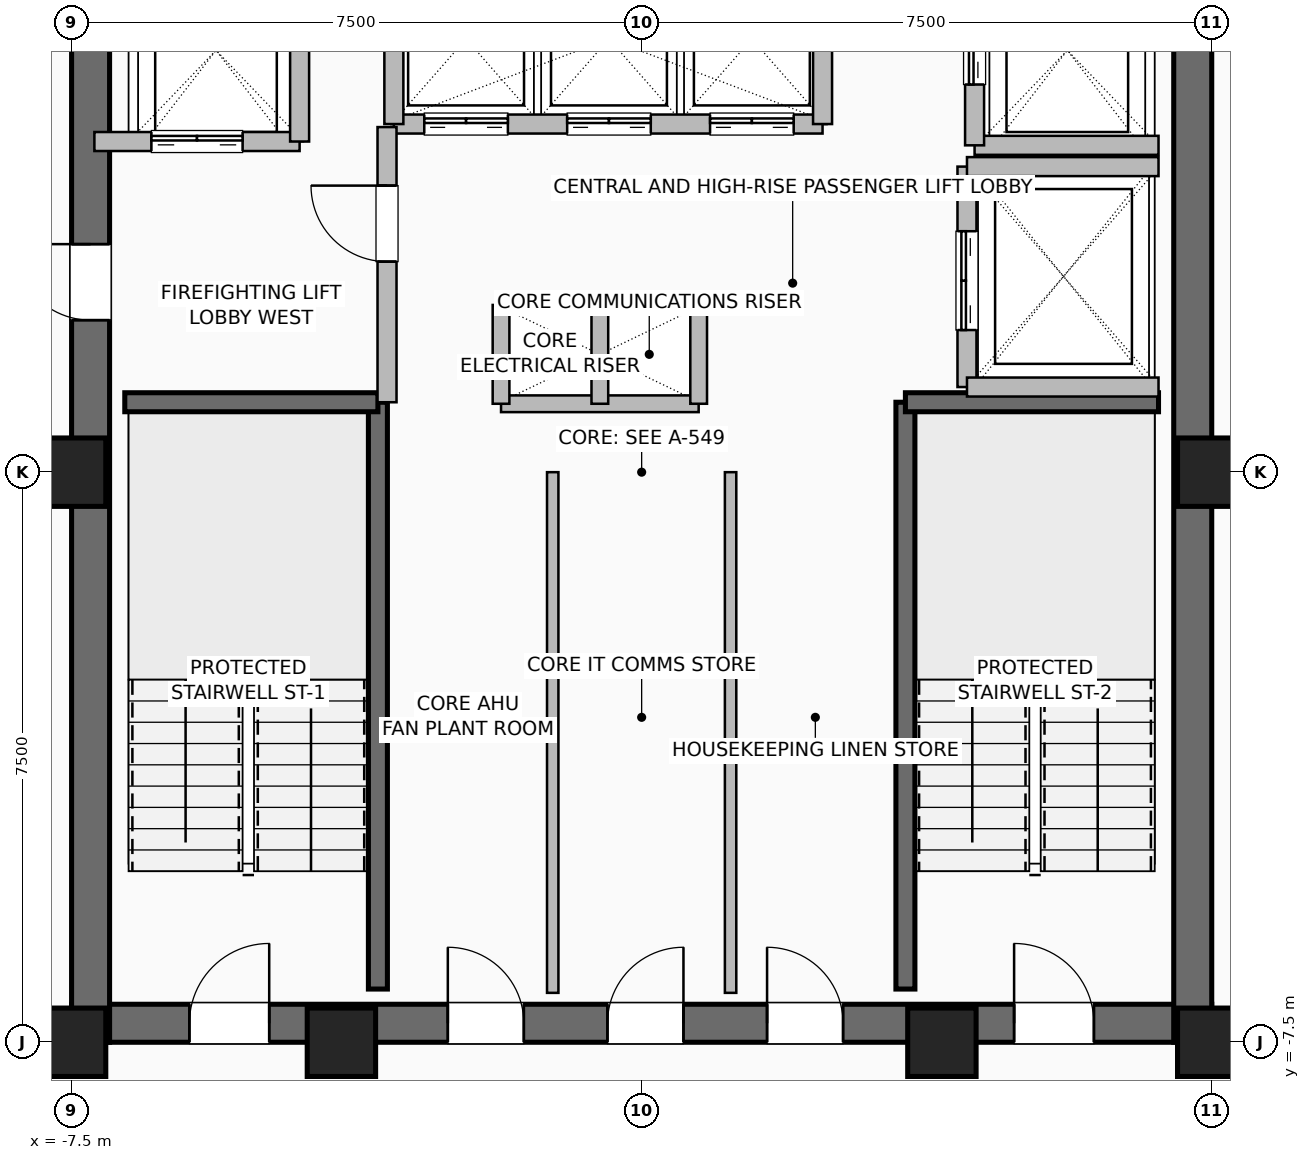
"""IFC4 building model, lengths in metres.
Left out: names, types, materials, properties, quantities, classifications, styles, units other than length and angle.
Written with IfcOpenShell. Run it as: python <this file> out.ifc"""

import sys

from ifc_helpers import new_model, si_unit, direction, frame, frame_2d, origin, origin_2d, place, context, subcontext, project, spatial, rectangle, hollow_rectangle, extrude, element, fill, save


model = new_model("IFC4")
c1 = context("Model", 3, precision=1e-05, world=origin(), true_north=direction((0.0, 1.0)))
c2 = subcontext(c1, "Body", "Model", "MODEL_VIEW")
j1 = project(units=[si_unit("LENGTHUNIT", "METRE"), si_unit("PLANEANGLEUNIT", "RADIAN")], contexts=[c1])
p1 = place(None, origin())
s1 = spatial("IfcSite", under=j1, at=p1, CompositionType="ELEMENT")
p2 = place(p1, origin())
s2 = spatial("IfcBuilding", under=s1, at=p2, CompositionType="ELEMENT")
p3 = place(p2, frame((0.0, 0.0, 191.4)))
s3 = spatial("IfcBuildingStorey", under=s2, at=p3, CompositionType="ELEMENT", Elevation=191.4)
for number, where, z_axis, x_axis in (
    (1, (-7.5, -7.5, 0.0), (0.0, 0.0, 1.0), (1.0, 0.0, 0.0)),
    (2, (-3.95, -7.5, 0.0), (0.0, 0.0, 1.0), (1.0, 0.0, 0.0)),
    (3, (3.95, -7.5, 0.0), (0.0, 0.0, 1.0), (1.0, 0.0, 0.0)),
    (4, (7.5, -7.5, 0.0), (0.0, 0.0, 1.0), (1.0, 0.0, 0.0)),
    (5, (7.5, 0.0, 0.0), (0.0, 0.0, 1.0), (1.0, 0.0, 0.0)),
    (6, (-7.5, 0.0, 0.0), (0.0, 0.0, 1.0), (1.0, 0.0, 0.0)),
):
    element("IfcColumn", number, at=place(p3, frame(where, z_axis=z_axis, x_axis=x_axis)), inside=s3, PredefinedType="COLUMN", context=c2, shape_type="SweptSolid", body=[
        extrude(hollow_rectangle(XDim=0.9, YDim=0.9, WallThickness=0.045, at=origin_2d()), origin(), (0.0, 0.0, 1.0), 3.6),
    ])
p4 = place(p3, frame((-7.5, -7.25, 0.0), z_axis=(0.0, 0.0, 1.0), x_axis=(1.0, 0.0, 0.0)))
e7 = element("IfcWall", 7, at=p4, inside=s3, PredefinedType="SHEAR", context=c2, shape_type="SweptSolid", body=[
    extrude(rectangle(XDim=15.0, YDim=0.5, at=frame_2d((7.5, 0.0))), origin(), (0.0, 0.0, 1.0), 3.36),
])
p5 = place(p4, frame((1.55, 0.0, 0.0)))
e8 = element("IfcOpeningElement", 8, at=p5, cuts=e7, PredefinedType="OPENING", context=c2, shape_type="SweptSolid", body=[
    extrude(rectangle(XDim=1.05, YDim=2.08, at=frame_2d((0.525, 1.04))), frame((0.0, 0.26, 0.0), z_axis=(0.0, -1.0, 0.0), x_axis=(1.0, 0.0, 0.0)), (0.0, 0.0, 1.0), 0.52),
])
p6 = place(p4, frame((12.4, 0.0, 0.0)))
e9 = element("IfcOpeningElement", 9, at=p6, cuts=e7, PredefinedType="OPENING", context=c2, shape_type="SweptSolid", body=[
    extrude(rectangle(XDim=1.05, YDim=2.08, at=frame_2d((0.525, 1.04))), frame((0.0, 0.26, 0.0), z_axis=(0.0, -1.0, 0.0), x_axis=(1.0, 0.0, 0.0)), (0.0, 0.0, 1.0), 0.52),
])
p7 = place(p4, frame((4.95, 0.0, 0.0)))
e10 = element("IfcOpeningElement", 10, at=p7, cuts=e7, PredefinedType="OPENING", context=c2, shape_type="SweptSolid", body=[
    extrude(rectangle(XDim=1.0, YDim=2.08, at=frame_2d((0.5, 1.04))), frame((0.0, 0.26, 0.0), z_axis=(0.0, -1.0, 0.0), x_axis=(1.0, 0.0, 0.0)), (0.0, 0.0, 1.0), 0.52),
])
p8 = place(p4, frame((7.05, 0.0, 0.0)))
e11 = element("IfcOpeningElement", 11, at=p8, cuts=e7, PredefinedType="OPENING", context=c2, shape_type="SweptSolid", body=[
    extrude(rectangle(XDim=1.0, YDim=2.08, at=frame_2d((0.5, 1.04))), frame((0.0, 0.26, 0.0), z_axis=(0.0, -1.0, 0.0), x_axis=(1.0, 0.0, 0.0)), (0.0, 0.0, 1.0), 0.52),
])
p9 = place(p4, frame((9.15, 0.0, 0.0)))
e12 = element("IfcOpeningElement", 12, at=p9, cuts=e7, PredefinedType="OPENING", context=c2, shape_type="SweptSolid", body=[
    extrude(rectangle(XDim=1.0, YDim=2.08, at=frame_2d((0.5, 1.04))), frame((0.0, 0.26, 0.0), z_axis=(0.0, -1.0, 0.0), x_axis=(1.0, 0.0, 0.0)), (0.0, 0.0, 1.0), 0.52),
])
p10 = place(p3, frame((-7.25, -7.5, 0.0), z_axis=(0.0, 0.0, 1.0), x_axis=(0.0, 1.0, 0.0)))
e13 = element("IfcWall", 13, at=p10, inside=s3, PredefinedType="SHEAR", context=c2, shape_type="SweptSolid", body=[
    extrude(rectangle(XDim=15.0, YDim=0.5, at=frame_2d((7.5, 0.0))), origin(), (0.0, 0.0, 1.0), 3.36),
])
p11 = place(p10, frame((9.5, 0.0, 0.0)))
e14 = element("IfcOpeningElement", 14, at=p11, cuts=e13, PredefinedType="OPENING", context=c2, shape_type="SweptSolid", body=[
    extrude(rectangle(XDim=1.0, YDim=2.08, at=frame_2d((0.5, 1.04))), frame((0.0, 0.26, 0.0), z_axis=(0.0, -1.0, 0.0), x_axis=(1.0, 0.0, 0.0)), (0.0, 0.0, 1.0), 0.52),
])
p12 = place(p3, frame((7.25, -7.5, 0.0), z_axis=(0.0, 0.0, 1.0), x_axis=(0.0, 1.0, 0.0)))
e15 = element("IfcWall", 15, at=p12, inside=s3, PredefinedType="SHEAR", context=c2, shape_type="SweptSolid", body=[
    extrude(rectangle(XDim=15.0, YDim=0.5, at=frame_2d((7.5, 0.0))), origin(), (0.0, 0.0, 1.0), 3.36),
])
p13 = place(p3, frame((-3.47, -6.8, 0.0), z_axis=(0.0, 0.0, 1.0), x_axis=(0.0, 1.0, 0.0)))
e16 = element("IfcWall", 16, at=p13, inside=s3, PredefinedType="SHEAR", context=c2, shape_type="SweptSolid", body=[
    extrude(rectangle(XDim=7.72, YDim=0.25, at=frame_2d((3.86, 0.0))), origin(), (0.0, 0.0, 1.0), 3.36),
])
p14 = place(p3, frame((-6.8, 0.92, 0.0), z_axis=(0.0, 0.0, 1.0), x_axis=(1.0, 0.0, 0.0)))
e17 = element("IfcWall", 17, at=p14, inside=s3, PredefinedType="SHEAR", context=c2, shape_type="SweptSolid", body=[
    extrude(rectangle(XDim=3.33, YDim=0.25, at=frame_2d((1.665, 0.0))), origin(), (0.0, 0.0, 1.0), 3.36),
])
p15 = place(p3, frame((3.47, -6.8, 0.0), z_axis=(0.0, 0.0, 1.0), x_axis=(0.0, 1.0, 0.0)))
e18 = element("IfcWall", 18, at=p15, inside=s3, PredefinedType="SHEAR", context=c2, shape_type="SweptSolid", body=[
    extrude(rectangle(XDim=7.72, YDim=0.25, at=frame_2d((3.86, 0.0))), origin(), (0.0, 0.0, 1.0), 3.36),
])
p16 = place(p3, frame((3.47, 0.92, 0.0), z_axis=(0.0, 0.0, 1.0), x_axis=(1.0, 0.0, 0.0)))
e19 = element("IfcWall", 19, at=p16, inside=s3, PredefinedType="SHEAR", context=c2, shape_type="SweptSolid", body=[
    extrude(rectangle(XDim=3.33, YDim=0.25, at=frame_2d((1.665, 0.0))), origin(), (0.0, 0.0, 1.0), 3.36),
])
for number, where, z_axis, x_axis in (
    (20, (-1.85, 2.2, 0.0), (0.0, 0.0, 1.0), (1.0, 0.0, 0.0)),
    (21, (-1.85, 0.9, 0.0), (0.0, 0.0, 1.0), (1.0, 0.0, 0.0)),
):
    element("IfcWall", number, at=place(p3, frame(where, z_axis=z_axis, x_axis=x_axis)), inside=s3, PredefinedType="PARTITIONING", context=c2, shape_type="SweptSolid", body=[
        extrude(rectangle(XDim=2.6, YDim=0.22, at=frame_2d((1.3, 0.0))), origin(), (0.0, 0.0, 1.0), 3.36),
    ])
for number, where, z_axis, x_axis in (
    (22, (-0.55, 0.9, 0.0), (0.0, 0.0, 1.0), (0.0, 1.0, 0.0)),
    (23, (0.75, 0.9, 0.0), (0.0, 0.0, 1.0), (0.0, 1.0, 0.0)),
    (24, (-1.85, 0.9, 0.0), (0.0, 0.0, 1.0), (0.0, 1.0, 0.0)),
):
    element("IfcWall", number, at=place(p3, frame(where, z_axis=z_axis, x_axis=x_axis)), inside=s3, PredefinedType="PARTITIONING", context=c2, shape_type="SweptSolid", body=[
        extrude(rectangle(XDim=1.3, YDim=0.22, at=frame_2d((0.65, 0.0))), origin(), (0.0, 0.0, 1.0), 3.36),
    ])
p17 = place(p3, frame((-3.26, 4.58, 0.0), z_axis=(0.0, 0.0, 1.0), x_axis=(1.0, 0.0, 0.0)))
e25 = element("IfcWall", 25, at=p17, inside=s3, PredefinedType="SHEAR", context=c2, shape_type="SweptSolid", body=[
    extrude(rectangle(XDim=5.64, YDim=0.25, at=frame_2d((2.82, 0.0))), origin(), (0.0, 0.0, 1.0), 3.36),
])
p18 = place(p17, frame((0.4, 0.0, 0.0)))
e26 = element("IfcOpeningElement", 26, at=p18, cuts=e25, PredefinedType="OPENING", context=c2, shape_type="SweptSolid", body=[
    extrude(rectangle(XDim=1.1, YDim=2.2, at=frame_2d((0.55, 1.1))), frame((0.0, 0.135, 0.0), z_axis=(0.0, -1.0, 0.0), x_axis=(1.0, 0.0, 0.0)), (0.0, 0.0, 1.0), 0.27),
])
p19 = place(p17, frame((2.28, 0.0, 0.0)))
e27 = element("IfcOpeningElement", 27, at=p19, cuts=e25, PredefinedType="OPENING", context=c2, shape_type="SweptSolid", body=[
    extrude(rectangle(XDim=1.1, YDim=2.2, at=frame_2d((0.55, 1.1))), frame((0.0, 0.135, 0.0), z_axis=(0.0, -1.0, 0.0), x_axis=(1.0, 0.0, 0.0)), (0.0, 0.0, 1.0), 0.27),
])
p20 = place(p17, frame((4.16, 0.0, 0.0)))
e28 = element("IfcOpeningElement", 28, at=p20, cuts=e25, PredefinedType="OPENING", context=c2, shape_type="SweptSolid", body=[
    extrude(rectangle(XDim=1.1, YDim=2.2, at=frame_2d((0.55, 1.1))), frame((0.0, 0.135, 0.0), z_axis=(0.0, -1.0, 0.0), x_axis=(1.0, 0.0, 0.0)), (0.0, 0.0, 1.0), 0.27),
])
for number, where, z_axis, x_axis in (
    (29, (-3.26, 4.58, 0.0), (0.0, 0.0, 1.0), (0.0, 1.0, 0.0)),
    (30, (2.38, 4.58, 0.0), (0.0, 0.0, 1.0), (0.0, 1.0, 0.0)),
):
    element("IfcWall", number, at=place(p3, frame(where, z_axis=z_axis, x_axis=x_axis)), inside=s3, PredefinedType="SHEAR", context=c2, shape_type="SweptSolid", body=[
        extrude(rectangle(XDim=2.22, YDim=0.25, at=frame_2d((1.11, 0.0))), origin(), (0.0, 0.0, 1.0), 3.36),
    ])
p21 = place(p3, frame((-7.2, 4.35, 0.0), z_axis=(0.0, 0.0, 1.0), x_axis=(1.0, 0.0, 0.0)))
e31 = element("IfcWall", 31, at=p21, inside=s3, PredefinedType="SHEAR", context=c2, shape_type="SweptSolid", body=[
    extrude(rectangle(XDim=2.7, YDim=0.25, at=frame_2d((1.35, 0.0))), origin(), (0.0, 0.0, 1.0), 3.36),
])
p22 = place(p21, frame((0.75, 0.0, 0.0)))
e32 = element("IfcOpeningElement", 32, at=p22, cuts=e31, PredefinedType="OPENING", context=c2, shape_type="SweptSolid", body=[
    extrude(rectangle(XDim=1.2, YDim=2.2, at=frame_2d((0.6, 1.1))), frame((0.0, 0.135, 0.0), z_axis=(0.0, -1.0, 0.0), x_axis=(1.0, 0.0, 0.0)), (0.0, 0.0, 1.0), 0.27),
])
p23 = place(p3, frame((-4.5, 4.35, 0.0), z_axis=(0.0, 0.0, 1.0), x_axis=(0.0, 1.0, 0.0)))
e33 = element("IfcWall", 33, at=p23, inside=s3, PredefinedType="SHEAR", context=c2, shape_type="SweptSolid", body=[
    extrude(rectangle(XDim=2.85, YDim=0.25, at=frame_2d((1.425, 0.0))), origin(), (0.0, 0.0, 1.0), 3.36),
])
p24 = place(p3, frame((4.38, 4.3, 0.0), z_axis=(0.0, 0.0, 1.0), x_axis=(1.0, 0.0, 0.0)))
e34 = element("IfcWall", 34, at=p24, inside=s3, PredefinedType="SHEAR", context=c2, shape_type="SweptSolid", body=[
    extrude(rectangle(XDim=2.42, YDim=0.25, at=frame_2d((1.21, 0.0))), origin(), (0.0, 0.0, 1.0), 3.36),
])
p25 = place(p3, frame((4.38, 4.3, 0.0), z_axis=(0.0, 0.0, 1.0), x_axis=(0.0, 1.0, 0.0)))
e35 = element("IfcWall", 35, at=p25, inside=s3, PredefinedType="SHEAR", context=c2, shape_type="SweptSolid", body=[
    extrude(rectangle(XDim=2.5, YDim=0.25, at=frame_2d((1.25, 0.0))), origin(), (0.0, 0.0, 1.0), 3.36),
])
p26 = place(p25, frame((0.8, 0.0, 0.0)))
e36 = element("IfcOpeningElement", 36, at=p26, cuts=e35, PredefinedType="OPENING", context=c2, shape_type="SweptSolid", body=[
    extrude(rectangle(XDim=1.2, YDim=2.2, at=frame_2d((0.6, 1.1))), frame((0.0, 0.135, 0.0), z_axis=(0.0, -1.0, 0.0), x_axis=(1.0, 0.0, 0.0)), (0.0, 0.0, 1.0), 0.27),
])
p27 = place(p3, frame((4.28, 1.12, 0.0), z_axis=(0.0, 0.0, 1.0), x_axis=(0.0, 1.0, 0.0)))
e37 = element("IfcWall", 37, at=p27, inside=s3, PredefinedType="SHEAR", context=c2, shape_type="SweptSolid", body=[
    extrude(rectangle(XDim=2.9, YDim=0.25, at=frame_2d((1.45, 0.0))), origin(), (0.0, 0.0, 1.0), 3.36),
])
p28 = place(p27, frame((0.75, 0.0, 0.0)))
e38 = element("IfcOpeningElement", 38, at=p28, cuts=e37, PredefinedType="OPENING", context=c2, shape_type="SweptSolid", body=[
    extrude(rectangle(XDim=1.3, YDim=2.3, at=frame_2d((0.65, 1.15))), frame((0.0, 0.135, 0.0), z_axis=(0.0, -1.0, 0.0), x_axis=(1.0, 0.0, 0.0)), (0.0, 0.0, 1.0), 0.27),
])
for number, where, z_axis, x_axis in (
    (39, (4.28, 1.12, 0.0), (0.0, 0.0, 1.0), (1.0, 0.0, 0.0)),
    (40, (4.28, 4.02, 0.0), (0.0, 0.0, 1.0), (1.0, 0.0, 0.0)),
):
    element("IfcWall", number, at=place(p3, frame(where, z_axis=z_axis, x_axis=x_axis)), inside=s3, PredefinedType="SHEAR", context=c2, shape_type="SweptSolid", body=[
        extrude(rectangle(XDim=2.52, YDim=0.25, at=frame_2d((1.26, 0.0))), origin(), (0.0, 0.0, 1.0), 3.36),
    ])
p29 = place(p3, frame((-3.35, 0.92, 0.0), z_axis=(0.0, 0.0, 1.0), x_axis=(0.0, 1.0, 0.0)))
e41 = element("IfcWall", 41, at=p29, inside=s3, PredefinedType="SHEAR", context=c2, shape_type="SweptSolid", body=[
    extrude(rectangle(XDim=3.62, YDim=0.25, at=frame_2d((1.81, 0.0))), origin(), (0.0, 0.0, 1.0), 3.36),
])
p30 = place(p29, frame((1.85, 0.0, 0.0)))
e42 = element("IfcOpeningElement", 42, at=p30, cuts=e41, PredefinedType="OPENING", context=c2, shape_type="SweptSolid", body=[
    extrude(rectangle(XDim=1.0, YDim=2.08, at=frame_2d((0.5, 1.04))), frame((0.0, 0.135, 0.0), z_axis=(0.0, -1.0, 0.0), x_axis=(1.0, 0.0, 0.0)), (0.0, 0.0, 1.0), 0.27),
])
for number, where, z_axis, x_axis in (
    (43, (-1.17, -6.85, 0.0), (0.0, 0.0, 1.0), (0.0, 1.0, 0.0)),
    (44, (1.17, -6.85, 0.0), (0.0, 0.0, 1.0), (0.0, 1.0, 0.0)),
):
    element("IfcWall", number, at=place(p3, frame(where, z_axis=z_axis, x_axis=x_axis)), inside=s3, PredefinedType="PARTITIONING", context=c2, shape_type="SweptSolid", body=[
        extrude(rectangle(XDim=6.85, YDim=0.15, at=frame_2d((3.425, 0.0))), origin(), (0.0, 0.0, 1.0), 3.36),
    ])
p31 = place(p3, frame((7.45, -7.48, 0.0), z_axis=(0.0, 0.0, 1.0), x_axis=(1.0, 0.0, 0.0)))
e45 = element("IfcWall", 45, at=p31, inside=s3, PredefinedType="PARTITIONING", context=c2, shape_type="SweptSolid", body=[
    extrude(rectangle(XDim=0.95, YDim=0.15, at=frame_2d((0.475, 0.0))), origin(), (0.0, 0.0, 1.0), 3.36),
])
p32 = place(p5, origin())
e46 = element("IfcDoor", 46, at=p32, inside=s3, OperationType="SINGLE_SWING_RIGHT", PredefinedType="DOOR", context=c2, shape_type="SweptSolid", body=[
    extrude(rectangle(XDim=1.05, YDim=2.08, at=frame_2d((0.525, 1.04))), frame((0.0, 0.025, 0.0), z_axis=(0.0, -1.0, 0.0), x_axis=(1.0, 0.0, 0.0)), (0.0, 0.0, 1.0), 0.05),
])
fill(e8, e46)
p33 = place(p6, origin())
e47 = element("IfcDoor", 47, at=p33, inside=s3, OperationType="SINGLE_SWING_LEFT", PredefinedType="DOOR", context=c2, shape_type="SweptSolid", body=[
    extrude(rectangle(XDim=1.05, YDim=2.08, at=frame_2d((0.525, 1.04))), frame((0.0, 0.025, 0.0), z_axis=(0.0, -1.0, 0.0), x_axis=(1.0, 0.0, 0.0)), (0.0, 0.0, 1.0), 0.05),
])
fill(e9, e47)
p34 = place(p11, origin())
e48 = element("IfcDoor", 48, at=p34, inside=s3, OperationType="SINGLE_SWING_RIGHT", PredefinedType="DOOR", context=c2, shape_type="SweptSolid", body=[
    extrude(rectangle(XDim=1.0, YDim=2.08, at=frame_2d((0.5, 1.04))), frame((0.0, 0.025, 0.0), z_axis=(0.0, -1.0, 0.0), x_axis=(1.0, 0.0, 0.0)), (0.0, 0.0, 1.0), 0.05),
])
fill(e14, e48)
p35 = place(p7, origin())
e49 = element("IfcDoor", 49, at=p35, inside=s3, OperationType="SINGLE_SWING_LEFT", PredefinedType="DOOR", context=c2, shape_type="SweptSolid", body=[
    extrude(rectangle(XDim=1.0, YDim=2.08, at=frame_2d((0.5, 1.04))), frame((0.0, 0.025, 0.0), z_axis=(0.0, -1.0, 0.0), x_axis=(1.0, 0.0, 0.0)), (0.0, 0.0, 1.0), 0.05),
])
fill(e10, e49)
p36 = place(p8, origin())
e50 = element("IfcDoor", 50, at=p36, inside=s3, OperationType="SINGLE_SWING_RIGHT", PredefinedType="DOOR", context=c2, shape_type="SweptSolid", body=[
    extrude(rectangle(XDim=1.0, YDim=2.08, at=frame_2d((0.5, 1.04))), frame((0.0, 0.025, 0.0), z_axis=(0.0, -1.0, 0.0), x_axis=(1.0, 0.0, 0.0)), (0.0, 0.0, 1.0), 0.05),
])
fill(e11, e50)
p37 = place(p9, origin())
e51 = element("IfcDoor", 51, at=p37, inside=s3, OperationType="SINGLE_SWING_LEFT", PredefinedType="DOOR", context=c2, shape_type="SweptSolid", body=[
    extrude(rectangle(XDim=1.0, YDim=2.08, at=frame_2d((0.5, 1.04))), frame((0.0, 0.025, 0.0), z_axis=(0.0, -1.0, 0.0), x_axis=(1.0, 0.0, 0.0)), (0.0, 0.0, 1.0), 0.05),
])
fill(e12, e51)
p38 = place(p18, origin())
e52 = element("IfcDoor", 52, at=p38, inside=s3, OperationType="DOUBLE_DOOR_SLIDING", PredefinedType="DOOR", context=c2, shape_type="SweptSolid", body=[
    extrude(rectangle(XDim=1.1, YDim=2.2, at=frame_2d((0.55, 1.1))), frame((0.0, 0.025, 0.0), z_axis=(0.0, -1.0, 0.0), x_axis=(1.0, 0.0, 0.0)), (0.0, 0.0, 1.0), 0.05),
])
fill(e26, e52)
p39 = place(p19, origin())
e53 = element("IfcDoor", 53, at=p39, inside=s3, OperationType="DOUBLE_DOOR_SLIDING", PredefinedType="DOOR", context=c2, shape_type="SweptSolid", body=[
    extrude(rectangle(XDim=1.1, YDim=2.2, at=frame_2d((0.55, 1.1))), frame((0.0, 0.025, 0.0), z_axis=(0.0, -1.0, 0.0), x_axis=(1.0, 0.0, 0.0)), (0.0, 0.0, 1.0), 0.05),
])
fill(e27, e53)
p40 = place(p20, origin())
e54 = element("IfcDoor", 54, at=p40, inside=s3, OperationType="DOUBLE_DOOR_SLIDING", PredefinedType="DOOR", context=c2, shape_type="SweptSolid", body=[
    extrude(rectangle(XDim=1.1, YDim=2.2, at=frame_2d((0.55, 1.1))), frame((0.0, 0.025, 0.0), z_axis=(0.0, -1.0, 0.0), x_axis=(1.0, 0.0, 0.0)), (0.0, 0.0, 1.0), 0.05),
])
fill(e28, e54)
p41 = place(p22, origin())
e55 = element("IfcDoor", 55, at=p41, inside=s3, OperationType="DOUBLE_DOOR_SLIDING", PredefinedType="DOOR", context=c2, shape_type="SweptSolid", body=[
    extrude(rectangle(XDim=1.2, YDim=2.2, at=frame_2d((0.6, 1.1))), frame((0.0, 0.025, 0.0), z_axis=(0.0, -1.0, 0.0), x_axis=(1.0, 0.0, 0.0)), (0.0, 0.0, 1.0), 0.05),
])
fill(e32, e55)
p42 = place(p26, origin())
e56 = element("IfcDoor", 56, at=p42, inside=s3, OperationType="DOUBLE_DOOR_SLIDING", PredefinedType="DOOR", context=c2, shape_type="SweptSolid", body=[
    extrude(rectangle(XDim=1.2, YDim=2.2, at=frame_2d((0.6, 1.1))), frame((0.0, 0.025, 0.0), z_axis=(0.0, -1.0, 0.0), x_axis=(1.0, 0.0, 0.0)), (0.0, 0.0, 1.0), 0.05),
])
fill(e36, e56)
p43 = place(p28, origin())
e57 = element("IfcDoor", 57, at=p43, inside=s3, OperationType="DOUBLE_DOOR_SLIDING", PredefinedType="DOOR", context=c2, shape_type="SweptSolid", body=[
    extrude(rectangle(XDim=1.3, YDim=2.3, at=frame_2d((0.65, 1.15))), frame((0.0, 0.025, 0.0), z_axis=(0.0, -1.0, 0.0), x_axis=(1.0, 0.0, 0.0)), (0.0, 0.0, 1.0), 0.05),
])
fill(e38, e57)
p44 = place(p30, origin())
e58 = element("IfcDoor", 58, at=p44, inside=s3, OperationType="SINGLE_SWING_RIGHT", PredefinedType="DOOR", context=c2, shape_type="SweptSolid", body=[
    extrude(rectangle(XDim=1.0, YDim=2.08, at=frame_2d((0.5, 1.04))), frame((0.0, 0.025, 0.0), z_axis=(0.0, -1.0, 0.0), x_axis=(1.0, 0.0, 0.0)), (0.0, 0.0, 1.0), 0.05),
])
fill(e42, e58)
save(model, sys.argv[1])
